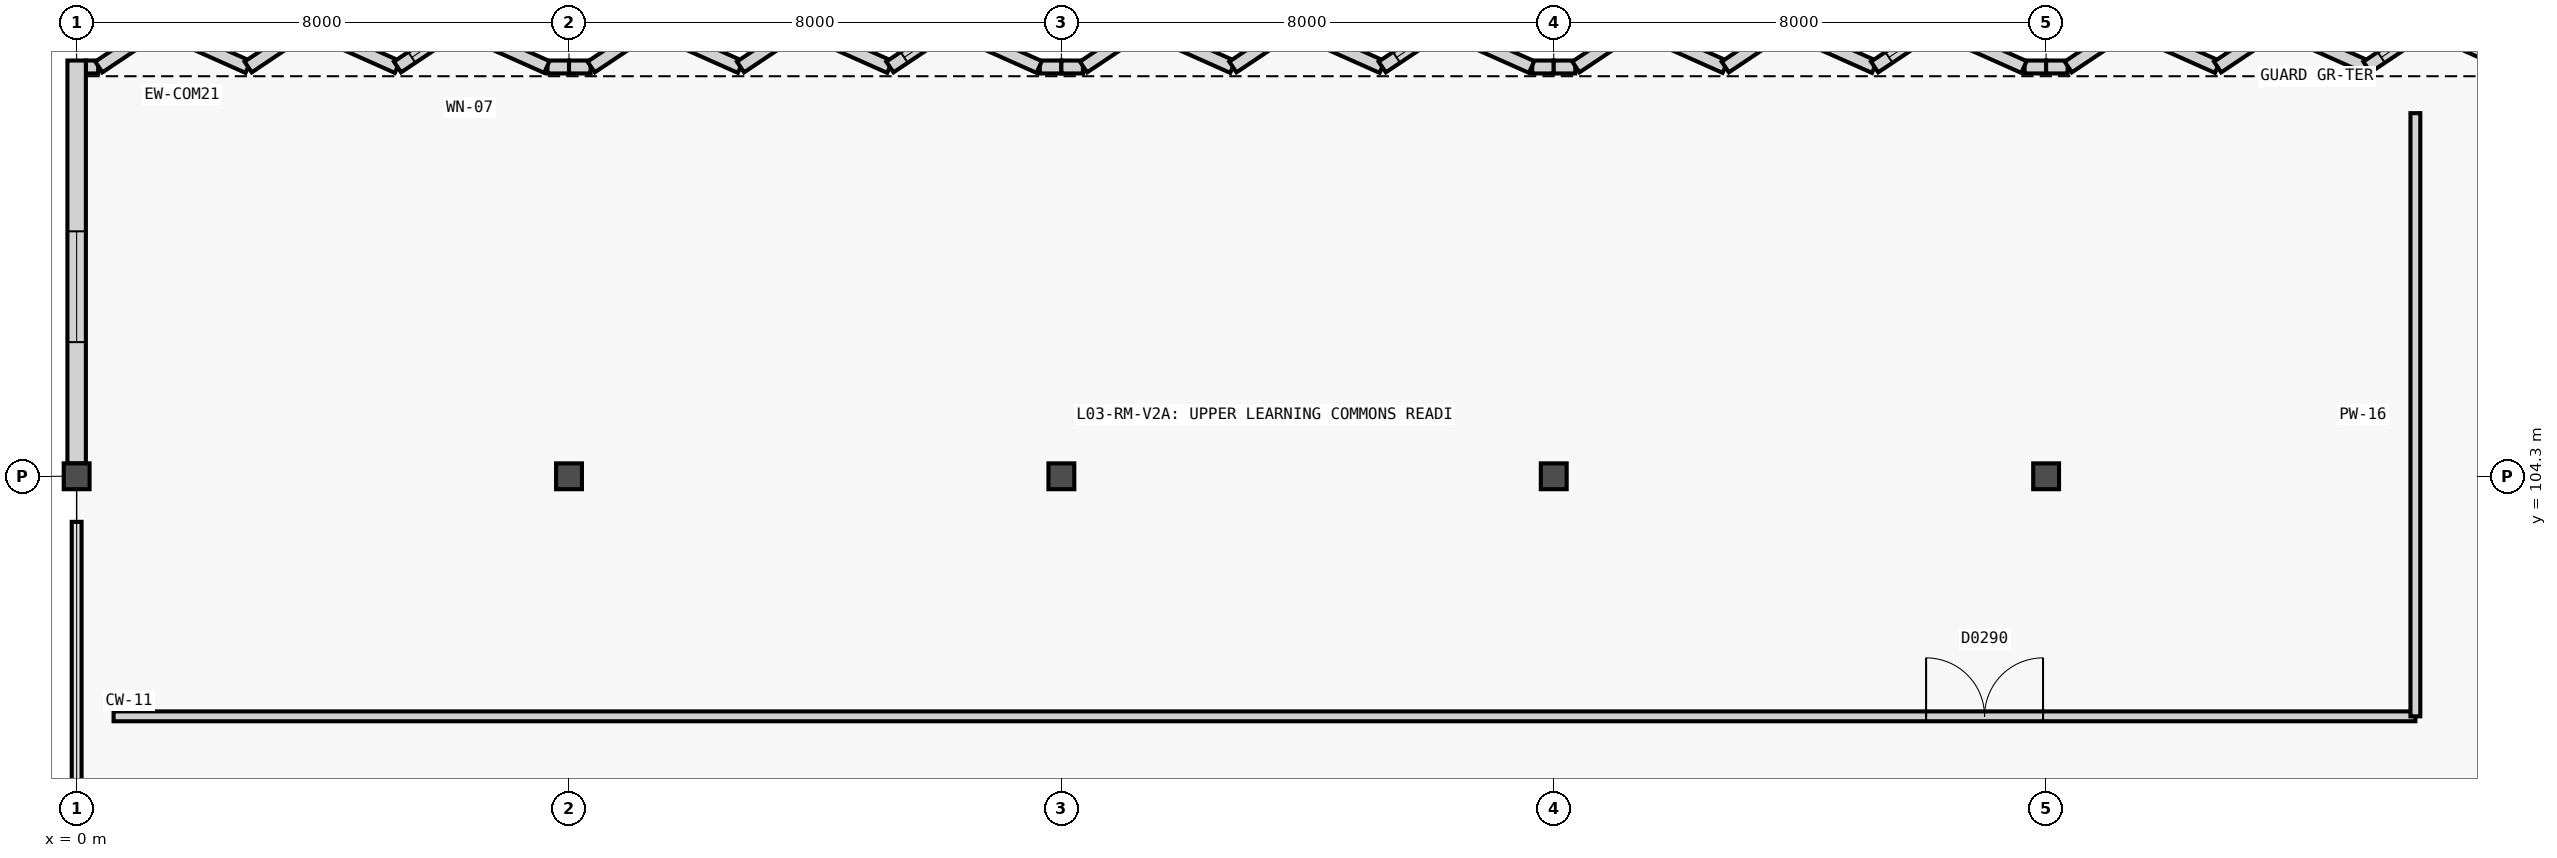
"""IFC4 building model, lengths in metres.
Left out: names, types, materials, properties, quantities, classifications, styles, units other than length and angle.
Written with IfcOpenShell. Run it as: python <this file> out.ifc"""

import sys

from ifc_helpers import new_model, si_unit, direction, frame, frame_2d, origin, origin_2d, place, context, subcontext, project, spatial, rectangle, extrude, element, fill, save


model = new_model("IFC4")
c1 = context("Model", 3, precision=1e-05, world=origin(), true_north=direction((0.0, 1.0)))
c2 = subcontext(c1, "Body", "Model", "MODEL_VIEW")
j1 = project(units=[si_unit("LENGTHUNIT", "METRE"), si_unit("PLANEANGLEUNIT", "RADIAN")], contexts=[c1])
p1 = place(None, origin())
s1 = spatial("IfcSite", under=j1, at=p1, CompositionType="ELEMENT")
p2 = place(p1, origin())
s2 = spatial("IfcBuilding", under=s1, at=p2, CompositionType="ELEMENT")
p3 = place(p2, frame((0.0, 0.0, 14.4)))
s3 = spatial("IfcBuildingStorey", under=s2, at=p3, CompositionType="ELEMENT", Elevation=14.4)
for number, where, z_axis, x_axis in (
    (1, (0.0, 104.3, 0.0), (0.0, 0.0, 1.0), (1.0, 0.0, 0.0)),
    (2, (8.0, 104.3, 0.0), (0.0, 0.0, 1.0), (1.0, 0.0, 0.0)),
    (3, (16.0, 104.3, 0.0), (0.0, 0.0, 1.0), (1.0, 0.0, 0.0)),
    (4, (24.0, 104.3, 0.0), (0.0, 0.0, 1.0), (1.0, 0.0, 0.0)),
    (5, (32.0, 104.3, 0.0), (0.0, 0.0, 1.0), (1.0, 0.0, 0.0)),
):
    element("IfcColumn", number, at=place(p3, frame(where, z_axis=z_axis, x_axis=x_axis)), inside=s3, PredefinedType="COLUMN", context=c2, shape_type="SweptSolid", body=[
        extrude(rectangle(XDim=0.42, YDim=0.42, at=origin_2d()), origin(), (0.0, 0.0, 1.0), 3.34),
    ])
p4 = place(p3, frame((0.145, 110.95, 0.0), z_axis=(0.0, 0.0, 1.0), x_axis=(1.0, 0.0, 0.0)))
e6 = element("IfcWall", 6, at=p4, inside=s3, PredefinedType="SOLIDWALL", context=c2, shape_type="SweptSolid", body=[
    extrude(rectangle(XDim=0.205, YDim=0.21, at=frame_2d((0.103, 0.0))), origin(), (0.0, 0.0, 1.0), 3.32),
])
for number, where, z_axis, x_axis in (
    (7, (7.65, 110.95, 0.0), (0.0, 0.0, 1.0), (1.0, 0.0, 0.0)),
    (8, (8.0, 110.95, 0.0), (0.0, 0.0, 1.0), (1.0, 0.0, 0.0)),
    (9, (15.65, 110.95, 0.0), (0.0, 0.0, 1.0), (1.0, 0.0, 0.0)),
    (10, (16.0, 110.95, 0.0), (0.0, 0.0, 1.0), (1.0, 0.0, 0.0)),
    (11, (23.65, 110.95, 0.0), (0.0, 0.0, 1.0), (1.0, 0.0, 0.0)),
    (12, (24.0, 110.95, 0.0), (0.0, 0.0, 1.0), (1.0, 0.0, 0.0)),
    (13, (31.65, 110.95, 0.0), (0.0, 0.0, 1.0), (1.0, 0.0, 0.0)),
    (14, (32.0, 110.95, 0.0), (0.0, 0.0, 1.0), (1.0, 0.0, 0.0)),
):
    element("IfcWall", number, at=place(p3, frame(where, z_axis=z_axis, x_axis=x_axis)), inside=s3, PredefinedType="SOLIDWALL", context=c2, shape_type="SweptSolid", body=[
        extrude(rectangle(XDim=0.35, YDim=0.21, at=frame_2d((0.175, 0.0))), origin(), (0.0, 0.0, 1.0), 3.32),
    ])
p5 = place(p3, frame((0.36, 110.95, 0.0), z_axis=(0.0, 0.0, 1.0), x_axis=(0.830858868059, 0.556483190553, 0.0)))
e15 = element("IfcWall", 15, at=p5, inside=s3, PredefinedType="SOLIDWALL", context=c2, shape_type="SweptSolid", body=[
    extrude(rectangle(XDim=1.168, YDim=0.21, at=frame_2d((0.584, 0.0))), origin(), (0.0, 0.0, 1.0), 3.32),
])
p6 = place(p3, frame((1.331, 111.6, 0.0), z_axis=(0.0, 0.0, 1.0), x_axis=(0.913083928543, -0.407771675618, 0.0)))
e16 = element("IfcWall", 16, at=p6, inside=s3, PredefinedType="SOLIDWALL", context=c2, shape_type="SweptSolid", body=[
    extrude(rectangle(XDim=1.594, YDim=0.21, at=frame_2d((0.797, 0.0))), origin(), (0.0, 0.0, 1.0), 3.32),
])
p7 = place(p3, frame((2.787, 110.95, 0.0), z_axis=(0.0, 0.0, 1.0), x_axis=(0.830858868059, 0.556483190553, 0.0)))
e17 = element("IfcWall", 17, at=p7, inside=s3, PredefinedType="SOLIDWALL", context=c2, shape_type="SweptSolid", body=[
    extrude(rectangle(XDim=1.168, YDim=0.21, at=frame_2d((0.584, 0.0))), origin(), (0.0, 0.0, 1.0), 3.32),
])
p8 = place(p3, frame((3.757, 111.6, 0.0), z_axis=(0.0, 0.0, 1.0), x_axis=(0.913109384471, -0.407714669826, 0.0)))
e18 = element("IfcWall", 18, at=p8, inside=s3, PredefinedType="SOLIDWALL", context=c2, shape_type="SweptSolid", body=[
    extrude(rectangle(XDim=1.595, YDim=0.21, at=frame_2d((0.797, 0.0))), origin(), (0.0, 0.0, 1.0), 3.32),
])
p9 = place(p3, frame((5.213, 110.95, 0.0), z_axis=(0.0, 0.0, 1.0), x_axis=(0.830858868059, 0.556483190553, 0.0)))
e19 = element("IfcWall", 19, at=p9, inside=s3, PredefinedType="SOLIDWALL", context=c2, shape_type="SweptSolid", body=[
    extrude(rectangle(XDim=1.168, YDim=0.21, at=frame_2d((0.584, 0.0))), origin(), (0.0, 0.0, 1.0), 3.32),
])
p10 = place(p9, frame((0.28, 0.0, 0.85)))
e20 = element("IfcOpeningElement", 20, at=p10, cuts=e19, PredefinedType="OPENING", context=c2, shape_type="SweptSolid", body=[
    extrude(rectangle(XDim=0.65, YDim=1.7, at=frame_2d((0.325, 0.85))), frame((0.0, 0.115, 0.0), z_axis=(0.0, -1.0, 0.0), x_axis=(1.0, 0.0, 0.0)), (0.0, 0.0, 1.0), 0.23),
])
p11 = place(p3, frame((6.184, 111.6, 0.0), z_axis=(0.0, 0.0, 1.0), x_axis=(0.913083928543, -0.407771675618, 0.0)))
e21 = element("IfcWall", 21, at=p11, inside=s3, PredefinedType="SOLIDWALL", context=c2, shape_type="SweptSolid", body=[
    extrude(rectangle(XDim=1.594, YDim=0.21, at=frame_2d((0.797, 0.0))), origin(), (0.0, 0.0, 1.0), 3.32),
])
p12 = place(p3, frame((8.36, 110.95, 0.0), z_axis=(0.0, 0.0, 1.0), x_axis=(0.830858868059, 0.556483190553, 0.0)))
e22 = element("IfcWall", 22, at=p12, inside=s3, PredefinedType="SOLIDWALL", context=c2, shape_type="SweptSolid", body=[
    extrude(rectangle(XDim=1.168, YDim=0.21, at=frame_2d((0.584, 0.0))), origin(), (0.0, 0.0, 1.0), 3.32),
])
p13 = place(p3, frame((9.331, 111.6, 0.0), z_axis=(0.0, 0.0, 1.0), x_axis=(0.913083928543, -0.407771675618, 0.0)))
e23 = element("IfcWall", 23, at=p13, inside=s3, PredefinedType="SOLIDWALL", context=c2, shape_type="SweptSolid", body=[
    extrude(rectangle(XDim=1.594, YDim=0.21, at=frame_2d((0.797, 0.0))), origin(), (0.0, 0.0, 1.0), 3.32),
])
p14 = place(p3, frame((10.787, 110.95, 0.0), z_axis=(0.0, 0.0, 1.0), x_axis=(0.830858868059, 0.556483190553, 0.0)))
e24 = element("IfcWall", 24, at=p14, inside=s3, PredefinedType="SOLIDWALL", context=c2, shape_type="SweptSolid", body=[
    extrude(rectangle(XDim=1.168, YDim=0.21, at=frame_2d((0.584, 0.0))), origin(), (0.0, 0.0, 1.0), 3.32),
])
p15 = place(p3, frame((11.757, 111.6, 0.0), z_axis=(0.0, 0.0, 1.0), x_axis=(0.913109384471, -0.407714669826, 0.0)))
e25 = element("IfcWall", 25, at=p15, inside=s3, PredefinedType="SOLIDWALL", context=c2, shape_type="SweptSolid", body=[
    extrude(rectangle(XDim=1.595, YDim=0.21, at=frame_2d((0.797, 0.0))), origin(), (0.0, 0.0, 1.0), 3.32),
])
p16 = place(p3, frame((13.213, 110.95, 0.0), z_axis=(0.0, 0.0, 1.0), x_axis=(0.830858868059, 0.556483190553, 0.0)))
e26 = element("IfcWall", 26, at=p16, inside=s3, PredefinedType="SOLIDWALL", context=c2, shape_type="SweptSolid", body=[
    extrude(rectangle(XDim=1.168, YDim=0.21, at=frame_2d((0.584, 0.0))), origin(), (0.0, 0.0, 1.0), 3.32),
])
p17 = place(p16, frame((0.28, 0.0, 0.85)))
e27 = element("IfcOpeningElement", 27, at=p17, cuts=e26, PredefinedType="OPENING", context=c2, shape_type="SweptSolid", body=[
    extrude(rectangle(XDim=0.65, YDim=1.7, at=frame_2d((0.325, 0.85))), frame((0.0, 0.115, 0.0), z_axis=(0.0, -1.0, 0.0), x_axis=(1.0, 0.0, 0.0)), (0.0, 0.0, 1.0), 0.23),
])
p18 = place(p3, frame((14.184, 111.6, 0.0), z_axis=(0.0, 0.0, 1.0), x_axis=(0.913083928543, -0.407771675618, 0.0)))
e28 = element("IfcWall", 28, at=p18, inside=s3, PredefinedType="SOLIDWALL", context=c2, shape_type="SweptSolid", body=[
    extrude(rectangle(XDim=1.594, YDim=0.21, at=frame_2d((0.797, 0.0))), origin(), (0.0, 0.0, 1.0), 3.32),
])
p19 = place(p3, frame((16.36, 110.95, 0.0), z_axis=(0.0, 0.0, 1.0), x_axis=(0.830858868059, 0.556483190553, 0.0)))
e29 = element("IfcWall", 29, at=p19, inside=s3, PredefinedType="SOLIDWALL", context=c2, shape_type="SweptSolid", body=[
    extrude(rectangle(XDim=1.168, YDim=0.21, at=frame_2d((0.584, 0.0))), origin(), (0.0, 0.0, 1.0), 3.32),
])
p20 = place(p3, frame((17.331, 111.6, 0.0), z_axis=(0.0, 0.0, 1.0), x_axis=(0.913083928543, -0.407771675618, 0.0)))
e30 = element("IfcWall", 30, at=p20, inside=s3, PredefinedType="SOLIDWALL", context=c2, shape_type="SweptSolid", body=[
    extrude(rectangle(XDim=1.594, YDim=0.21, at=frame_2d((0.797, 0.0))), origin(), (0.0, 0.0, 1.0), 3.32),
])
p21 = place(p3, frame((18.787, 110.95, 0.0), z_axis=(0.0, 0.0, 1.0), x_axis=(0.830858868059, 0.556483190553, 0.0)))
e31 = element("IfcWall", 31, at=p21, inside=s3, PredefinedType="SOLIDWALL", context=c2, shape_type="SweptSolid", body=[
    extrude(rectangle(XDim=1.168, YDim=0.21, at=frame_2d((0.584, 0.0))), origin(), (0.0, 0.0, 1.0), 3.32),
])
p22 = place(p3, frame((19.757, 111.6, 0.0), z_axis=(0.0, 0.0, 1.0), x_axis=(0.913109384471, -0.407714669826, 0.0)))
e32 = element("IfcWall", 32, at=p22, inside=s3, PredefinedType="SOLIDWALL", context=c2, shape_type="SweptSolid", body=[
    extrude(rectangle(XDim=1.595, YDim=0.21, at=frame_2d((0.797, 0.0))), origin(), (0.0, 0.0, 1.0), 3.32),
])
p23 = place(p3, frame((21.213, 110.95, 0.0), z_axis=(0.0, 0.0, 1.0), x_axis=(0.830858868059, 0.556483190553, 0.0)))
e33 = element("IfcWall", 33, at=p23, inside=s3, PredefinedType="SOLIDWALL", context=c2, shape_type="SweptSolid", body=[
    extrude(rectangle(XDim=1.168, YDim=0.21, at=frame_2d((0.584, 0.0))), origin(), (0.0, 0.0, 1.0), 3.32),
])
p24 = place(p23, frame((0.28, 0.0, 0.85)))
e34 = element("IfcOpeningElement", 34, at=p24, cuts=e33, PredefinedType="OPENING", context=c2, shape_type="SweptSolid", body=[
    extrude(rectangle(XDim=0.65, YDim=1.7, at=frame_2d((0.325, 0.85))), frame((0.0, 0.115, 0.0), z_axis=(0.0, -1.0, 0.0), x_axis=(1.0, 0.0, 0.0)), (0.0, 0.0, 1.0), 0.23),
])
p25 = place(p3, frame((22.184, 111.6, 0.0), z_axis=(0.0, 0.0, 1.0), x_axis=(0.913083928543, -0.407771675618, 0.0)))
e35 = element("IfcWall", 35, at=p25, inside=s3, PredefinedType="SOLIDWALL", context=c2, shape_type="SweptSolid", body=[
    extrude(rectangle(XDim=1.594, YDim=0.21, at=frame_2d((0.797, 0.0))), origin(), (0.0, 0.0, 1.0), 3.32),
])
p26 = place(p3, frame((24.36, 110.95, 0.0), z_axis=(0.0, 0.0, 1.0), x_axis=(0.830858868059, 0.556483190553, 0.0)))
e36 = element("IfcWall", 36, at=p26, inside=s3, PredefinedType="SOLIDWALL", context=c2, shape_type="SweptSolid", body=[
    extrude(rectangle(XDim=1.168, YDim=0.21, at=frame_2d((0.584, 0.0))), origin(), (0.0, 0.0, 1.0), 3.32),
])
p27 = place(p3, frame((25.331, 111.6, 0.0), z_axis=(0.0, 0.0, 1.0), x_axis=(0.913083928543, -0.407771675618, 0.0)))
e37 = element("IfcWall", 37, at=p27, inside=s3, PredefinedType="SOLIDWALL", context=c2, shape_type="SweptSolid", body=[
    extrude(rectangle(XDim=1.594, YDim=0.21, at=frame_2d((0.797, 0.0))), origin(), (0.0, 0.0, 1.0), 3.32),
])
p28 = place(p3, frame((26.787, 110.95, 0.0), z_axis=(0.0, 0.0, 1.0), x_axis=(0.830858868059, 0.556483190553, 0.0)))
e38 = element("IfcWall", 38, at=p28, inside=s3, PredefinedType="SOLIDWALL", context=c2, shape_type="SweptSolid", body=[
    extrude(rectangle(XDim=1.168, YDim=0.21, at=frame_2d((0.584, 0.0))), origin(), (0.0, 0.0, 1.0), 3.32),
])
p29 = place(p3, frame((27.757, 111.6, 0.0), z_axis=(0.0, 0.0, 1.0), x_axis=(0.913109384471, -0.407714669826, 0.0)))
e39 = element("IfcWall", 39, at=p29, inside=s3, PredefinedType="SOLIDWALL", context=c2, shape_type="SweptSolid", body=[
    extrude(rectangle(XDim=1.595, YDim=0.21, at=frame_2d((0.797, 0.0))), origin(), (0.0, 0.0, 1.0), 3.32),
])
p30 = place(p3, frame((29.213, 110.95, 0.0), z_axis=(0.0, 0.0, 1.0), x_axis=(0.830858868059, 0.556483190553, 0.0)))
e40 = element("IfcWall", 40, at=p30, inside=s3, PredefinedType="SOLIDWALL", context=c2, shape_type="SweptSolid", body=[
    extrude(rectangle(XDim=1.168, YDim=0.21, at=frame_2d((0.584, 0.0))), origin(), (0.0, 0.0, 1.0), 3.32),
])
p31 = place(p30, frame((0.28, 0.0, 0.85)))
e41 = element("IfcOpeningElement", 41, at=p31, cuts=e40, PredefinedType="OPENING", context=c2, shape_type="SweptSolid", body=[
    extrude(rectangle(XDim=0.65, YDim=1.7, at=frame_2d((0.325, 0.85))), frame((0.0, 0.115, 0.0), z_axis=(0.0, -1.0, 0.0), x_axis=(1.0, 0.0, 0.0)), (0.0, 0.0, 1.0), 0.23),
])
p32 = place(p3, frame((30.184, 111.6, 0.0), z_axis=(0.0, 0.0, 1.0), x_axis=(0.913083928543, -0.407771675618, 0.0)))
e42 = element("IfcWall", 42, at=p32, inside=s3, PredefinedType="SOLIDWALL", context=c2, shape_type="SweptSolid", body=[
    extrude(rectangle(XDim=1.594, YDim=0.21, at=frame_2d((0.797, 0.0))), origin(), (0.0, 0.0, 1.0), 3.32),
])
p33 = place(p3, frame((32.36, 110.95, 0.0), z_axis=(0.0, 0.0, 1.0), x_axis=(0.830858868059, 0.556483190553, 0.0)))
e43 = element("IfcWall", 43, at=p33, inside=s3, PredefinedType="SOLIDWALL", context=c2, shape_type="SweptSolid", body=[
    extrude(rectangle(XDim=1.168, YDim=0.21, at=frame_2d((0.584, 0.0))), origin(), (0.0, 0.0, 1.0), 3.32),
])
p34 = place(p3, frame((33.331, 111.6, 0.0), z_axis=(0.0, 0.0, 1.0), x_axis=(0.913083928543, -0.407771675618, 0.0)))
e44 = element("IfcWall", 44, at=p34, inside=s3, PredefinedType="SOLIDWALL", context=c2, shape_type="SweptSolid", body=[
    extrude(rectangle(XDim=1.594, YDim=0.21, at=frame_2d((0.797, 0.0))), origin(), (0.0, 0.0, 1.0), 3.32),
])
p35 = place(p3, frame((34.787, 110.95, 0.0), z_axis=(0.0, 0.0, 1.0), x_axis=(0.830858868059, 0.556483190553, 0.0)))
e45 = element("IfcWall", 45, at=p35, inside=s3, PredefinedType="SOLIDWALL", context=c2, shape_type="SweptSolid", body=[
    extrude(rectangle(XDim=1.168, YDim=0.21, at=frame_2d((0.584, 0.0))), origin(), (0.0, 0.0, 1.0), 3.32),
])
p36 = place(p3, frame((35.757, 111.6, 0.0), z_axis=(0.0, 0.0, 1.0), x_axis=(0.913109384471, -0.407714669826, 0.0)))
e46 = element("IfcWall", 46, at=p36, inside=s3, PredefinedType="SOLIDWALL", context=c2, shape_type="SweptSolid", body=[
    extrude(rectangle(XDim=1.595, YDim=0.21, at=frame_2d((0.797, 0.0))), origin(), (0.0, 0.0, 1.0), 3.32),
])
p37 = place(p3, frame((37.213, 110.95, 0.0), z_axis=(0.0, 0.0, 1.0), x_axis=(0.830858868059, 0.556483190553, 0.0)))
e47 = element("IfcWall", 47, at=p37, inside=s3, PredefinedType="SOLIDWALL", context=c2, shape_type="SweptSolid", body=[
    extrude(rectangle(XDim=1.168, YDim=0.21, at=frame_2d((0.584, 0.0))), origin(), (0.0, 0.0, 1.0), 3.32),
])
p38 = place(p37, frame((0.28, 0.0, 0.85)))
e48 = element("IfcOpeningElement", 48, at=p38, cuts=e47, PredefinedType="OPENING", context=c2, shape_type="SweptSolid", body=[
    extrude(rectangle(XDim=0.65, YDim=1.7, at=frame_2d((0.325, 0.85))), frame((0.0, 0.115, 0.0), z_axis=(0.0, -1.0, 0.0), x_axis=(1.0, 0.0, 0.0)), (0.0, 0.0, 1.0), 0.23),
])
p39 = place(p3, frame((38.184, 111.6, 0.0), z_axis=(0.0, 0.0, 1.0), x_axis=(0.913083928543, -0.407771675618, 0.0)))
e49 = element("IfcWall", 49, at=p39, inside=s3, PredefinedType="SOLIDWALL", context=c2, shape_type="SweptSolid", body=[
    extrude(rectangle(XDim=1.594, YDim=0.21, at=frame_2d((0.797, 0.0))), origin(), (0.0, 0.0, 1.0), 3.32),
])
p40 = place(p3, frame((0.0, 104.508, 0.0), z_axis=(0.0, 0.0, 1.0), x_axis=(0.0, 1.0, 0.0)))
e50 = element("IfcWall", 50, at=p40, inside=s3, PredefinedType="SOLIDWALL", context=c2, shape_type="SweptSolid", body=[
    extrude(rectangle(XDim=6.547, YDim=0.3, at=frame_2d((3.273, 0.0))), origin(), (0.0, 0.0, 1.0), 3.32),
])
p41 = place(p40, frame((1.972, 0.0, 0.9)))
e51 = element("IfcOpeningElement", 51, at=p41, cuts=e50, PredefinedType="OPENING", context=c2, shape_type="SweptSolid", body=[
    extrude(rectangle(XDim=1.8, YDim=1.55, at=frame_2d((0.9, 0.775))), frame((0.0, 0.16, 0.0), z_axis=(0.0, -1.0, 0.0), x_axis=(1.0, 0.0, 0.0)), (0.0, 0.0, 1.0), 0.32),
])
p42 = place(p3, frame((0.6, 100.4, 0.0), z_axis=(0.0, 0.0, 1.0), x_axis=(1.0, 0.0, 0.0)))
e52 = element("IfcWall", 52, at=p42, inside=s3, PredefinedType="PARTITIONING", context=c2, shape_type="SweptSolid", body=[
    extrude(rectangle(XDim=37.4, YDim=0.16, at=frame_2d((18.7, 0.0))), origin(), (0.0, 0.0, 1.0), 3.34),
])
p43 = place(p42, frame((29.45, 0.0, 0.0)))
e53 = element("IfcOpeningElement", 53, at=p43, cuts=e52, PredefinedType="OPENING", context=c2, shape_type="SweptSolid", body=[
    extrude(rectangle(XDim=1.9, YDim=2.3, at=frame_2d((0.95, 1.15))), frame((0.0, 0.09, 0.0), z_axis=(0.0, -1.0, 0.0), x_axis=(1.0, 0.0, 0.0)), (0.0, 0.0, 1.0), 0.18),
])
p44 = place(p3, frame((38.0, 100.4, 0.0), z_axis=(0.0, 0.0, 1.0), x_axis=(0.0, 1.0, 0.0)))
e54 = element("IfcWall", 54, at=p44, inside=s3, PredefinedType="PARTITIONING", context=c2, shape_type="SweptSolid", body=[
    extrude(rectangle(XDim=9.8, YDim=0.16, at=frame_2d((4.9, 0.0))), origin(), (0.0, 0.0, 1.0), 3.34),
])
p45 = place(p10, origin())
e55 = element("IfcWindow", 55, at=p45, inside=s3, PartitioningType="SINGLE_PANEL", PredefinedType="WINDOW", context=c2, shape_type="SweptSolid", body=[
    extrude(rectangle(XDim=0.65, YDim=1.7, at=frame_2d((0.325, 0.85))), frame((0.0, 0.03, 0.0), z_axis=(0.0, -1.0, 0.0), x_axis=(1.0, 0.0, 0.0)), (0.0, 0.0, 1.0), 0.06),
])
fill(e20, e55)
p46 = place(p17, origin())
e56 = element("IfcWindow", 56, at=p46, inside=s3, PartitioningType="SINGLE_PANEL", PredefinedType="WINDOW", context=c2, shape_type="SweptSolid", body=[
    extrude(rectangle(XDim=0.65, YDim=1.7, at=frame_2d((0.325, 0.85))), frame((0.0, 0.03, 0.0), z_axis=(0.0, -1.0, 0.0), x_axis=(1.0, 0.0, 0.0)), (0.0, 0.0, 1.0), 0.06),
])
fill(e27, e56)
p47 = place(p24, origin())
e57 = element("IfcWindow", 57, at=p47, inside=s3, PartitioningType="SINGLE_PANEL", PredefinedType="WINDOW", context=c2, shape_type="SweptSolid", body=[
    extrude(rectangle(XDim=0.65, YDim=1.7, at=frame_2d((0.325, 0.85))), frame((0.0, 0.03, 0.0), z_axis=(0.0, -1.0, 0.0), x_axis=(1.0, 0.0, 0.0)), (0.0, 0.0, 1.0), 0.06),
])
fill(e34, e57)
p48 = place(p31, origin())
e58 = element("IfcWindow", 58, at=p48, inside=s3, PartitioningType="SINGLE_PANEL", PredefinedType="WINDOW", context=c2, shape_type="SweptSolid", body=[
    extrude(rectangle(XDim=0.65, YDim=1.7, at=frame_2d((0.325, 0.85))), frame((0.0, 0.03, 0.0), z_axis=(0.0, -1.0, 0.0), x_axis=(1.0, 0.0, 0.0)), (0.0, 0.0, 1.0), 0.06),
])
fill(e41, e58)
p49 = place(p38, origin())
e59 = element("IfcWindow", 59, at=p49, inside=s3, PartitioningType="SINGLE_PANEL", PredefinedType="WINDOW", context=c2, shape_type="SweptSolid", body=[
    extrude(rectangle(XDim=0.65, YDim=1.7, at=frame_2d((0.325, 0.85))), frame((0.0, 0.03, 0.0), z_axis=(0.0, -1.0, 0.0), x_axis=(1.0, 0.0, 0.0)), (0.0, 0.0, 1.0), 0.06),
])
fill(e48, e59)
p50 = place(p41, origin())
e60 = element("IfcWindow", 60, at=p50, inside=s3, PartitioningType="SINGLE_PANEL", PredefinedType="WINDOW", context=c2, shape_type="SweptSolid", body=[
    extrude(rectangle(XDim=1.8, YDim=1.55, at=frame_2d((0.9, 0.775))), frame((0.0, 0.03, 0.0), z_axis=(0.0, -1.0, 0.0), x_axis=(1.0, 0.0, 0.0)), (0.0, 0.0, 1.0), 0.06),
])
fill(e51, e60)
p51 = place(p43, origin())
e61 = element("IfcDoor", 61, at=p51, inside=s3, OperationType="DOUBLE_DOOR_SINGLE_SWING", PredefinedType="DOOR", context=c2, shape_type="SweptSolid", body=[
    extrude(rectangle(XDim=1.9, YDim=2.3, at=frame_2d((0.95, 1.15))), frame((0.0, 0.025, 0.0), z_axis=(0.0, -1.0, 0.0), x_axis=(1.0, 0.0, 0.0)), (0.0, 0.0, 1.0), 0.05),
])
fill(e53, e61)
save(model, sys.argv[1])
